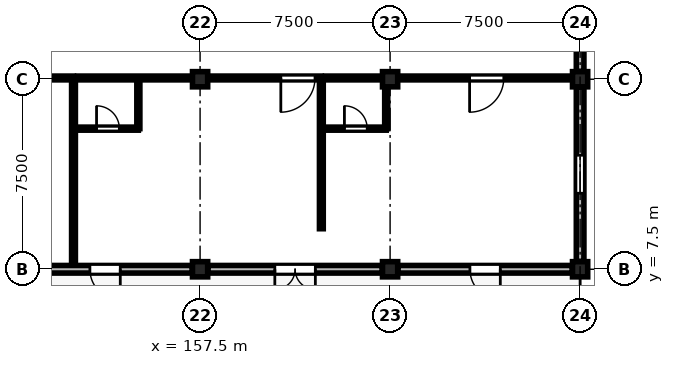
"""IFC4 building model, lengths in metres.
Left out: names, types, materials, properties, quantities, classifications, styles, units other than length and angle.
Written with IfcOpenShell. Run it as: python <this file> out.ifc"""

import sys

from ifc_helpers import new_model, si_unit, direction, frame, frame_2d, origin, origin_2d, place, context, subcontext, project, spatial, rectangle, circle, extrude, element, fill, save


model = new_model("IFC4")
c1 = context("Model", 3, precision=1e-05, world=origin(), true_north=direction((0.0, 1.0)))
c2 = subcontext(c1, "Body", "Model", "MODEL_VIEW")
j1 = project(units=[si_unit("LENGTHUNIT", "METRE"), si_unit("PLANEANGLEUNIT", "RADIAN")], contexts=[c1])
p1 = place(None, origin())
s1 = spatial("IfcSite", under=j1, at=p1, CompositionType="ELEMENT")
p2 = place(p1, origin())
s2 = spatial("IfcBuilding", under=s1, at=p2, CompositionType="ELEMENT")
p3 = place(p2, frame((0.0, 0.0, 14.1)))
s3 = spatial("IfcBuildingStorey", under=s2, at=p3, CompositionType="ELEMENT", Elevation=14.1)
for number, where, z_axis, x_axis in (
    (1, (157.5, 7.5, 0.0), (0.0, 0.0, 1.0), (1.0, 0.0, 0.0)),
    (2, (157.5, 15.0, 0.0), (0.0, 0.0, 1.0), (1.0, 0.0, 0.0)),
    (3, (165.0, 7.5, 0.0), (0.0, 0.0, 1.0), (1.0, 0.0, 0.0)),
):
    element("IfcColumn", number, at=place(p3, frame(where, z_axis=z_axis, x_axis=x_axis)), inside=s3, PredefinedType="COLUMN", context=c2, shape_type="SweptSolid", body=[
        extrude(rectangle(XDim=0.6, YDim=0.6, at=origin_2d()), origin(), (0.0, 0.0, 1.0), 3.75),
    ])
for number, where, z_axis, x_axis in (
    (4, (165.0, 15.0, 0.0), (0.0, 0.0, 1.0), (1.0, 0.0, 0.0)),
    (5, (172.5, 7.5, 0.0), (0.0, 0.0, 1.0), (1.0, 0.0, 0.0)),
):
    element("IfcColumn", number, at=place(p3, frame(where, z_axis=z_axis, x_axis=x_axis)), inside=s3, PredefinedType="COLUMN", context=c2, shape_type="SweptSolid", body=[
        extrude(circle(Radius=0.3, at=origin_2d()), origin(), (0.0, 0.0, 1.0), 3.75),
    ])
p4 = place(p3, frame((172.5, 15.0, 0.0), z_axis=(0.0, 0.0, 1.0), x_axis=(1.0, 0.0, 0.0)))
e6 = element("IfcColumn", 6, at=p4, inside=s3, PredefinedType="COLUMN", context=c2, shape_type="SweptSolid", body=[
    extrude(rectangle(XDim=0.6, YDim=0.6, at=origin_2d()), origin(), (0.0, 0.0, 1.0), 3.75),
])
p5 = place(p3, frame((157.19, 7.5, 0.0), z_axis=(0.0, 0.0, 1.0), x_axis=(-1.0, 0.0, 0.0)))
e7 = element("IfcWall", 7, at=p5, inside=s3, PredefinedType="STANDARD", context=c2, shape_type="SweptSolid", body=[
    extrude(rectangle(XDim=6.88, YDim=0.3, at=frame_2d((3.44, 0.0))), origin(), (0.0, 0.0, 1.0), 2.87),
])
p6 = place(p5, frame((2.84, 0.0, 0.0)))
e8 = element("IfcOpeningElement", 8, at=p6, cuts=e7, PredefinedType="OPENING", context=c2, shape_type="SweptSolid", body=[
    extrude(rectangle(XDim=1.2, YDim=2.3, at=frame_2d((0.6, 1.15))), frame((0.0, 0.16, 0.0), z_axis=(0.0, -1.0, 0.0), x_axis=(1.0, 0.0, 0.0)), (0.0, 0.0, 1.0), 0.32),
])
p7 = place(p3, frame((164.69, 7.5, 0.0), z_axis=(0.0, 0.0, 1.0), x_axis=(-1.0, 0.0, 0.0)))
e9 = element("IfcWall", 9, at=p7, inside=s3, PredefinedType="STANDARD", context=c2, shape_type="SweptSolid", body=[
    extrude(rectangle(XDim=6.88, YDim=0.3, at=frame_2d((3.44, 0.0))), origin(), (0.0, 0.0, 1.0), 2.87),
])
p8 = place(p7, frame((2.64, 0.0, 0.0)))
e10 = element("IfcOpeningElement", 10, at=p8, cuts=e9, PredefinedType="OPENING", context=c2, shape_type="SweptSolid", body=[
    extrude(rectangle(XDim=1.6, YDim=2.35, at=frame_2d((0.8, 1.175))), frame((0.0, 0.16, 0.0), z_axis=(0.0, -1.0, 0.0), x_axis=(1.0, 0.0, 0.0)), (0.0, 0.0, 1.0), 0.32),
])
p9 = place(p3, frame((172.19, 7.5, 0.0), z_axis=(0.0, 0.0, 1.0), x_axis=(-1.0, 0.0, 0.0)))
e11 = element("IfcWall", 11, at=p9, inside=s3, PredefinedType="STANDARD", context=c2, shape_type="SweptSolid", body=[
    extrude(rectangle(XDim=6.88, YDim=0.3, at=frame_2d((3.44, 0.0))), origin(), (0.0, 0.0, 1.0), 2.87),
])
p10 = place(p9, frame((2.84, 0.0, 0.0)))
e12 = element("IfcOpeningElement", 12, at=p10, cuts=e11, PredefinedType="OPENING", context=c2, shape_type="SweptSolid", body=[
    extrude(rectangle(XDim=1.2, YDim=2.3, at=frame_2d((0.6, 1.15))), frame((0.0, 0.16, 0.0), z_axis=(0.0, -1.0, 0.0), x_axis=(1.0, 0.0, 0.0)), (0.0, 0.0, 1.0), 0.32),
])
p11 = place(p3, frame((172.5, 14.69, 0.0), z_axis=(0.0, 0.0, 1.0), x_axis=(0.0, -1.0, 0.0)))
e13 = element("IfcWall", 13, at=p11, inside=s3, PredefinedType="STANDARD", context=c2, shape_type="SweptSolid", body=[
    extrude(rectangle(XDim=6.88, YDim=0.3, at=frame_2d((3.44, 0.0))), origin(), (0.0, 0.0, 1.0), 2.87),
])
p12 = place(p11, frame((2.69, 0.0, 0.9)))
e14 = element("IfcOpeningElement", 14, at=p12, cuts=e13, PredefinedType="OPENING", context=c2, shape_type="SweptSolid", body=[
    extrude(rectangle(XDim=1.5, YDim=1.69, at=frame_2d((0.75, 0.845))), frame((0.0, 0.16, 0.0), z_axis=(0.0, -1.0, 0.0), x_axis=(1.0, 0.0, 0.0)), (0.0, 0.0, 1.0), 0.32),
])
p13 = place(p3, frame((172.5, 22.19, 0.0), z_axis=(0.0, 0.0, 1.0), x_axis=(0.0, -1.0, 0.0)))
e15 = element("IfcWall", 15, at=p13, inside=s3, PredefinedType="STANDARD", context=c2, shape_type="SweptSolid", body=[
    extrude(rectangle(XDim=6.88, YDim=0.3, at=frame_2d((3.44, 0.0))), origin(), (0.0, 0.0, 1.0), 2.87),
])
p14 = place(p13, frame((2.39, 0.0, 0.9)))
e16 = element("IfcOpeningElement", 16, at=p14, cuts=e15, PredefinedType="OPENING", context=c2, shape_type="SweptSolid", body=[
    extrude(rectangle(XDim=2.1, YDim=1.69, at=frame_2d((1.05, 0.845))), frame((0.0, 0.16, 0.0), z_axis=(0.0, -1.0, 0.0), x_axis=(1.0, 0.0, 0.0)), (0.0, 0.0, 1.0), 0.32),
])
p15 = place(p3, frame((152.503, 15.05, 0.0), z_axis=(0.0, 0.0, 1.0), x_axis=(-1.0, 0.0, 0.0)))
e17 = element("IfcWall", 17, at=p15, inside=s3, PredefinedType="PARTITIONING", context=c2, shape_type="SweptSolid", body=[
    extrude(rectangle(XDim=9.624, YDim=0.15, at=frame_2d((4.812, 0.0))), origin(), (0.0, 0.0, 1.0), 2.855),
])
p16 = place(p15, frame((4.914, 0.0, 0.0)))
e18 = element("IfcOpeningElement", 18, at=p16, cuts=e17, PredefinedType="OPENING", context=c2, shape_type="SweptSolid", body=[
    extrude(rectangle(XDim=1.35, YDim=2.25, at=frame_2d((0.675, 1.125))), frame((0.0, 0.085, 0.0), z_axis=(0.0, -1.0, 0.0), x_axis=(1.0, 0.0, 0.0)), (0.0, 0.0, 1.0), 0.17),
])
p17 = place(p3, frame((162.287, 15.05, 0.0), z_axis=(0.0, 0.0, 1.0), x_axis=(-1.0, 0.0, 0.0)))
e19 = element("IfcWall", 19, at=p17, inside=s3, PredefinedType="PARTITIONING", context=c2, shape_type="SweptSolid", body=[
    extrude(rectangle(XDim=9.623, YDim=0.15, at=frame_2d((4.812, 0.0))), origin(), (0.0, 0.0, 1.0), 2.855),
])
p18 = place(p17, frame((0.25, 0.0, 0.0)))
e20 = element("IfcOpeningElement", 20, at=p18, cuts=e19, PredefinedType="OPENING", context=c2, shape_type="SweptSolid", body=[
    extrude(rectangle(XDim=1.35, YDim=2.25, at=frame_2d((0.675, 1.125))), frame((0.0, 0.085, 0.0), z_axis=(0.0, -1.0, 0.0), x_axis=(1.0, 0.0, 0.0)), (0.0, 0.0, 1.0), 0.17),
])
p19 = place(p3, frame((152.663, 13.05, 0.0), z_axis=(0.0, 0.0, 1.0), x_axis=(1.0, 0.0, 0.0)))
e21 = element("IfcWall", 21, at=p19, inside=s3, PredefinedType="PARTITIONING", context=c2, shape_type="SweptSolid", body=[
    extrude(rectangle(XDim=2.4, YDim=0.12, at=frame_2d((1.2, 0.0))), origin(), (0.0, 0.0, 1.0), 3.455),
])
p20 = place(p19, frame((0.75, 0.0, 0.0)))
e22 = element("IfcOpeningElement", 22, at=p20, cuts=e21, PredefinedType="OPENING", context=c2, shape_type="SweptSolid", body=[
    extrude(rectangle(XDim=0.9, YDim=2.1, at=frame_2d((0.45, 1.05))), frame((0.0, 0.07, 0.0), z_axis=(0.0, -1.0, 0.0), x_axis=(1.0, 0.0, 0.0)), (0.0, 0.0, 1.0), 0.14),
])
p21 = place(p3, frame((155.063, 13.05, 0.0), z_axis=(0.0, 0.0, 1.0), x_axis=(0.0, 1.0, 0.0)))
e23 = element("IfcWall", 23, at=p21, inside=s3, PredefinedType="PARTITIONING", context=c2, shape_type="SweptSolid", body=[
    extrude(rectangle(XDim=2.0, YDim=0.12, at=frame_2d((1.0, 0.0))), origin(), (0.0, 0.0, 1.0), 3.455),
])
p22 = place(p3, frame((172.07, 15.05, 0.0), z_axis=(0.0, 0.0, 1.0), x_axis=(-1.0, 0.0, 0.0)))
e24 = element("IfcWall", 24, at=p22, inside=s3, PredefinedType="PARTITIONING", context=c2, shape_type="SweptSolid", body=[
    extrude(rectangle(XDim=9.623, YDim=0.15, at=frame_2d((4.812, 0.0))), origin(), (0.0, 0.0, 1.0), 2.855),
])
p23 = place(p22, frame((2.582, 0.0, 0.0)))
e25 = element("IfcOpeningElement", 25, at=p23, cuts=e24, PredefinedType="OPENING", context=c2, shape_type="SweptSolid", body=[
    extrude(rectangle(XDim=1.35, YDim=2.25, at=frame_2d((0.675, 1.125))), frame((0.0, 0.085, 0.0), z_axis=(0.0, -1.0, 0.0), x_axis=(1.0, 0.0, 0.0)), (0.0, 0.0, 1.0), 0.17),
])
p24 = place(p3, frame((162.447, 13.05, 0.0), z_axis=(0.0, 0.0, 1.0), x_axis=(1.0, 0.0, 0.0)))
e26 = element("IfcWall", 26, at=p24, inside=s3, PredefinedType="PARTITIONING", context=c2, shape_type="SweptSolid", body=[
    extrude(rectangle(XDim=2.4, YDim=0.12, at=frame_2d((1.2, 0.0))), origin(), (0.0, 0.0, 1.0), 3.455),
])
p25 = place(p24, frame((0.75, 0.0, 0.0)))
e27 = element("IfcOpeningElement", 27, at=p25, cuts=e26, PredefinedType="OPENING", context=c2, shape_type="SweptSolid", body=[
    extrude(rectangle(XDim=0.9, YDim=2.1, at=frame_2d((0.45, 1.05))), frame((0.0, 0.07, 0.0), z_axis=(0.0, -1.0, 0.0), x_axis=(1.0, 0.0, 0.0)), (0.0, 0.0, 1.0), 0.14),
])
p26 = place(p3, frame((164.847, 13.05, 0.0), z_axis=(0.0, 0.0, 1.0), x_axis=(0.0, 1.0, 0.0)))
e28 = element("IfcWall", 28, at=p26, inside=s3, PredefinedType="PARTITIONING", context=c2, shape_type="SweptSolid", body=[
    extrude(rectangle(XDim=2.0, YDim=0.12, at=frame_2d((1.0, 0.0))), origin(), (0.0, 0.0, 1.0), 2.955),
])
p27 = place(p3, frame((152.503, 7.85, 0.0), z_axis=(0.0, 0.0, 1.0), x_axis=(0.0, 1.0, 0.0)))
e29 = element("IfcWall", 29, at=p27, inside=s3, PredefinedType="PARTITIONING", context=c2, shape_type="SweptSolid", body=[
    extrude(rectangle(XDim=7.2, YDim=0.15, at=frame_2d((3.6, 0.0))), origin(), (0.0, 0.0, 1.0), 3.455),
])
p28 = place(p3, frame((162.287, 9.1, 0.0), z_axis=(0.0, 0.0, 1.0), x_axis=(0.0, 1.0, 0.0)))
e30 = element("IfcWall", 30, at=p28, inside=s3, PredefinedType="PARTITIONING", context=c2, shape_type="SweptSolid", body=[
    extrude(rectangle(XDim=5.95, YDim=0.15, at=frame_2d((2.975, 0.0))), origin(), (0.0, 0.0, 1.0), 3.455),
])
p29 = place(p6, origin())
e31 = element("IfcDoor", 31, at=p29, inside=s3, OperationType="SINGLE_SWING_LEFT", PredefinedType="DOOR", context=c2, shape_type="SweptSolid", body=[
    extrude(rectangle(XDim=1.2, YDim=2.3, at=frame_2d((0.6, 1.15))), frame((0.0, 0.025, 0.0), z_axis=(0.0, -1.0, 0.0), x_axis=(1.0, 0.0, 0.0)), (0.0, 0.0, 1.0), 0.05),
])
fill(e8, e31)
p30 = place(p8, origin())
e32 = element("IfcDoor", 32, at=p30, inside=s3, OperationType="DOUBLE_DOOR_SINGLE_SWING", PredefinedType="DOOR", context=c2, shape_type="SweptSolid", body=[
    extrude(rectangle(XDim=1.6, YDim=2.35, at=frame_2d((0.8, 1.175))), frame((0.0, 0.025, 0.0), z_axis=(0.0, -1.0, 0.0), x_axis=(1.0, 0.0, 0.0)), (0.0, 0.0, 1.0), 0.05),
])
fill(e10, e32)
p31 = place(p10, origin())
e33 = element("IfcDoor", 33, at=p31, inside=s3, OperationType="SINGLE_SWING_LEFT", PredefinedType="DOOR", context=c2, shape_type="SweptSolid", body=[
    extrude(rectangle(XDim=1.2, YDim=2.3, at=frame_2d((0.6, 1.15))), frame((0.0, 0.025, 0.0), z_axis=(0.0, -1.0, 0.0), x_axis=(1.0, 0.0, 0.0)), (0.0, 0.0, 1.0), 0.05),
])
fill(e12, e33)
p32 = place(p12, origin())
e34 = element("IfcWindow", 34, at=p32, inside=s3, PartitioningType="SINGLE_PANEL", PredefinedType="WINDOW", context=c2, shape_type="SweptSolid", body=[
    extrude(rectangle(XDim=1.5, YDim=1.69, at=frame_2d((0.75, 0.845))), frame((0.0, 0.03, 0.0), z_axis=(0.0, -1.0, 0.0), x_axis=(1.0, 0.0, 0.0)), (0.0, 0.0, 1.0), 0.06),
])
fill(e14, e34)
p33 = place(p18, origin())
e35 = element("IfcDoor", 35, at=p33, inside=s3, OperationType="SINGLE_SWING_RIGHT", PredefinedType="DOOR", context=c2, shape_type="SweptSolid", body=[
    extrude(rectangle(XDim=1.35, YDim=2.25, at=frame_2d((0.675, 1.125))), frame((0.0, 0.025, 0.0), z_axis=(0.0, -1.0, 0.0), x_axis=(1.0, 0.0, 0.0)), (0.0, 0.0, 1.0), 0.05),
])
fill(e20, e35)
p34 = place(p20, origin())
e36 = element("IfcDoor", 36, at=p34, inside=s3, OperationType="SINGLE_SWING_LEFT", PredefinedType="DOOR", context=c2, shape_type="SweptSolid", body=[
    extrude(rectangle(XDim=0.9, YDim=2.1, at=frame_2d((0.45, 1.05))), frame((0.0, 0.025, 0.0), z_axis=(0.0, -1.0, 0.0), x_axis=(1.0, 0.0, 0.0)), (0.0, 0.0, 1.0), 0.05),
])
fill(e22, e36)
p35 = place(p23, origin())
e37 = element("IfcDoor", 37, at=p35, inside=s3, OperationType="SINGLE_SWING_RIGHT", PredefinedType="DOOR", context=c2, shape_type="SweptSolid", body=[
    extrude(rectangle(XDim=1.35, YDim=2.25, at=frame_2d((0.675, 1.125))), frame((0.0, 0.025, 0.0), z_axis=(0.0, -1.0, 0.0), x_axis=(1.0, 0.0, 0.0)), (0.0, 0.0, 1.0), 0.05),
])
fill(e25, e37)
p36 = place(p25, origin())
e38 = element("IfcDoor", 38, at=p36, inside=s3, OperationType="SINGLE_SWING_LEFT", PredefinedType="DOOR", context=c2, shape_type="SweptSolid", body=[
    extrude(rectangle(XDim=0.9, YDim=2.1, at=frame_2d((0.45, 1.05))), frame((0.0, 0.025, 0.0), z_axis=(0.0, -1.0, 0.0), x_axis=(1.0, 0.0, 0.0)), (0.0, 0.0, 1.0), 0.05),
])
fill(e27, e38)
save(model, sys.argv[1])
